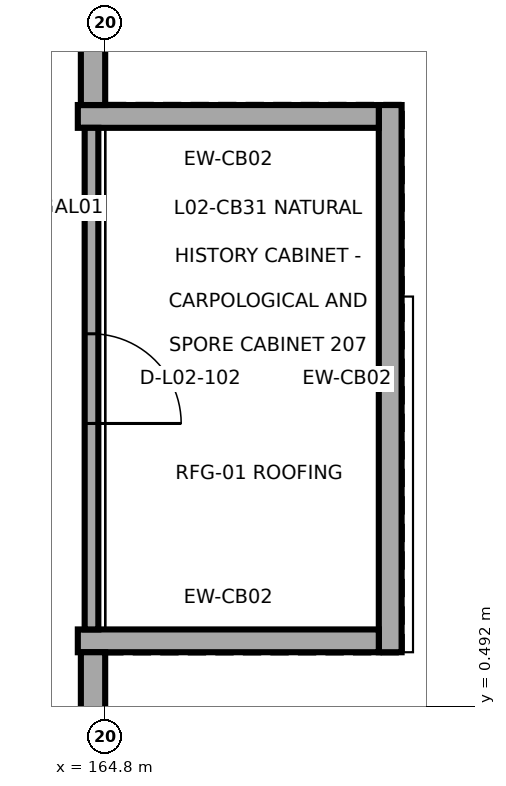
"""IFC4 building model, lengths in metres.
Left out: names, types, materials, properties, quantities, classifications, styles, units other than length and angle.
Written with IfcOpenShell. Run it as: python <this file> out.ifc"""

import sys

from ifc_helpers import new_model, si_unit, direction, frame, frame_2d, origin, place, context, subcontext, project, spatial, rectangle, extrude, element, fill, save


model = new_model("IFC4")
c1 = context("Model", 3, precision=1e-05, world=origin(), true_north=direction((0.0, 1.0)))
c2 = subcontext(c1, "Body", "Model", "MODEL_VIEW")
j1 = project(units=[si_unit("LENGTHUNIT", "METRE"), si_unit("PLANEANGLEUNIT", "RADIAN")], contexts=[c1])
p1 = place(None, origin())
s1 = spatial("IfcSite", under=j1, at=p1, CompositionType="ELEMENT")
p2 = place(p1, origin())
s2 = spatial("IfcBuilding", under=s1, at=p2, CompositionType="ELEMENT")
p3 = place(p2, frame((0.0, 0.0, 12.9)))
s3 = spatial("IfcBuildingStorey", under=s2, at=p3, CompositionType="ELEMENT", Elevation=12.9)
p4 = place(p3, frame((168.55, 1.2, 0.0), z_axis=(0.0, 0.0, 1.0), x_axis=(0.0, 1.0, 0.0)))
e1 = element("IfcWall", 1, at=p4, inside=s3, PredefinedType="SOLIDWALL", context=c2, shape_type="SweptSolid", body=[
    extrude(rectangle(XDim=7.2, YDim=0.3, at=frame_2d((3.6, 0.0))), origin(), (0.0, 0.0, 1.0), 2.99),
])
for number, where, z_axis, x_axis in (
    (2, (164.44, 1.35, 0.0), (0.0, 0.0, 1.0), (1.0, 0.0, 0.0)),
    (3, (168.4, 8.25, 0.0), (0.0, 0.0, 1.0), (-1.0, 0.0, 0.0)),
):
    element("IfcWall", number, at=place(p3, frame(where, z_axis=z_axis, x_axis=x_axis)), inside=s3, PredefinedType="SOLIDWALL", context=c2, shape_type="SweptSolid", body=[
        extrude(rectangle(XDim=3.96, YDim=0.3, at=frame_2d((1.98, 0.0))), origin(), (0.0, 0.0, 1.0), 2.99),
    ])
p5 = place(p3, frame((164.64, 0.3, 0.0), z_axis=(0.0, 0.0, 1.0), x_axis=(0.0, 1.0, 0.0)))
e4 = element("IfcWall", 4, at=p5, inside=s3, PredefinedType="SOLIDWALL", context=c2, shape_type="SweptSolid", body=[
    extrude(rectangle(XDim=0.9, YDim=0.32, at=frame_2d((0.45, 0.0))), origin(), (0.0, 0.0, 1.0), 3.88),
])
p6 = place(p3, frame((164.64, 8.4, 0.0), z_axis=(0.0, 0.0, 1.0), x_axis=(0.0, 1.0, 0.0)))
e5 = element("IfcWall", 5, at=p6, inside=s3, PredefinedType="SOLIDWALL", context=c2, shape_type="SweptSolid", body=[
    extrude(rectangle(XDim=0.9, YDim=0.32, at=frame_2d((0.45, 0.0))), origin(), (0.0, 0.0, 1.0), 3.88),
])
p7 = place(p3, frame((164.62, 1.5, 0.0), z_axis=(0.0, 0.0, 1.0), x_axis=(0.0, 1.0, 0.0)))
e6 = element("IfcWall", 6, at=p7, inside=s3, PredefinedType="PARTITIONING", context=c2, shape_type="SweptSolid", body=[
    extrude(rectangle(XDim=6.6, YDim=0.18, at=frame_2d((3.3, 0.0))), origin(), (0.0, 0.0, 1.0), 2.99),
])
p8 = place(p7, frame((2.71, 0.0, 0.0)))
e7 = element("IfcOpeningElement", 7, at=p8, cuts=e6, PredefinedType="OPENING", context=c2, shape_type="SweptSolid", body=[
    extrude(rectangle(XDim=1.18, YDim=2.25, at=frame_2d((0.59, 1.125))), frame((0.0, 0.1, 0.0), z_axis=(0.0, -1.0, 0.0), x_axis=(1.0, 0.0, 0.0)), (0.0, 0.0, 1.0), 0.2),
])
p9 = place(p8, origin())
e8 = element("IfcDoor", 8, at=p9, inside=s3, OperationType="SINGLE_SWING_RIGHT", PredefinedType="DOOR", context=c2, shape_type="SweptSolid", body=[
    extrude(rectangle(XDim=1.18, YDim=2.25, at=frame_2d((0.59, 1.125))), frame((0.0, 0.025, 0.0), z_axis=(0.0, -1.0, 0.0), x_axis=(1.0, 0.0, 0.0)), (0.0, 0.0, 1.0), 0.05),
])
fill(e7, e8)
save(model, sys.argv[1])
